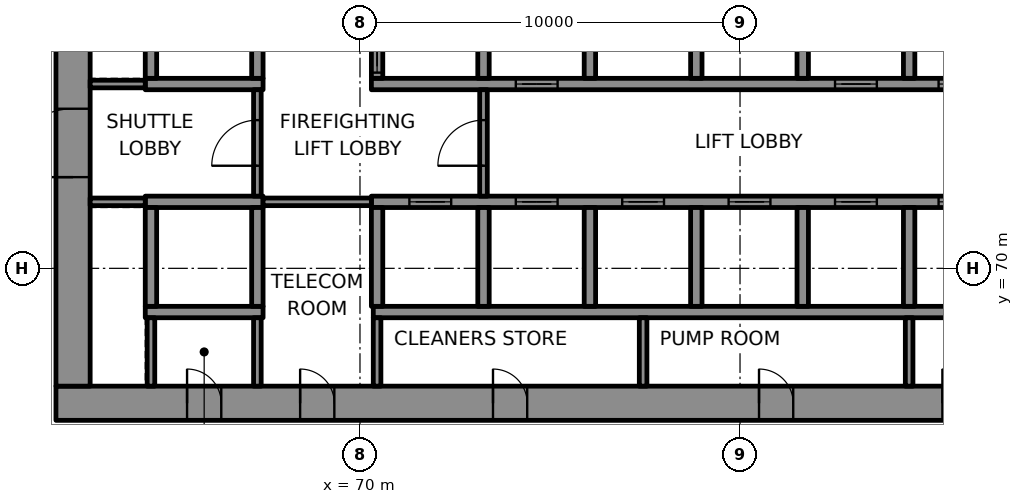
"""IFC4 building model, lengths in metres.
Left out: names, types, materials, properties, quantities, classifications, styles, units other than length and angle.
Written with IfcOpenShell. Run it as: python <this file> out.ifc"""

import sys

from ifc_helpers import new_model, si_unit, direction, frame, frame_2d, origin, place, context, subcontext, project, spatial, rectangle, extrude, element, fill, save


model = new_model("IFC4")
c1 = context("Model", 3, precision=1e-05, world=origin(), true_north=direction((0.0, 1.0)))
c2 = subcontext(c1, "Body", "Model", "MODEL_VIEW")
j1 = project(units=[si_unit("LENGTHUNIT", "METRE"), si_unit("PLANEANGLEUNIT", "RADIAN")], contexts=[c1])
p1 = place(None, origin())
s1 = spatial("IfcSite", under=j1, at=p1, CompositionType="ELEMENT")
p2 = place(p1, origin())
s2 = spatial("IfcBuilding", under=s1, at=p2, CompositionType="ELEMENT")
p3 = place(p2, frame((0.0, 0.0, 21.8)))
s3 = spatial("IfcBuildingStorey", under=s2, at=p3, CompositionType="ELEMENT", Elevation=21.8)
p4 = place(p3, frame((62.0, 66.45, 0.0), z_axis=(0.0, 0.0, 1.0), x_axis=(1.0, 0.0, 0.0)))
e1 = element("IfcWall", 1, at=p4, inside=s3, PredefinedType="SHEAR", context=c2, shape_type="SweptSolid", body=[
    extrude(rectangle(XDim=26.0, YDim=0.9, at=frame_2d((13.0, 0.0))), origin(), (0.0, 0.0, 1.0), 4.3),
])
p5 = place(p4, frame((3.45, 0.0, 0.0)))
e2 = element("IfcOpeningElement", 2, at=p5, cuts=e1, PredefinedType="OPENING", context=c2, shape_type="SweptSolid", body=[
    extrude(rectangle(XDim=0.9, YDim=2.1, at=frame_2d((0.45, 1.05))), frame((0.0, 0.46, 0.0), z_axis=(0.0, -1.0, 0.0), x_axis=(1.0, 0.0, 0.0)), (0.0, 0.0, 1.0), 0.92),
])
p6 = place(p4, frame((6.425, 0.0, 0.0)))
e3 = element("IfcOpeningElement", 3, at=p6, cuts=e1, PredefinedType="OPENING", context=c2, shape_type="SweptSolid", body=[
    extrude(rectangle(XDim=0.9, YDim=2.1, at=frame_2d((0.45, 1.05))), frame((0.0, 0.46, 0.0), z_axis=(0.0, -1.0, 0.0), x_axis=(1.0, 0.0, 0.0)), (0.0, 0.0, 1.0), 0.92),
])
p7 = place(p4, frame((11.5, 0.0, 0.0)))
e4 = element("IfcOpeningElement", 4, at=p7, cuts=e1, PredefinedType="OPENING", context=c2, shape_type="SweptSolid", body=[
    extrude(rectangle(XDim=0.9, YDim=2.1, at=frame_2d((0.45, 1.05))), frame((0.0, 0.46, 0.0), z_axis=(0.0, -1.0, 0.0), x_axis=(1.0, 0.0, 0.0)), (0.0, 0.0, 1.0), 0.92),
])
p8 = place(p4, frame((18.5, 0.0, 0.0)))
e5 = element("IfcOpeningElement", 5, at=p8, cuts=e1, PredefinedType="OPENING", context=c2, shape_type="SweptSolid", body=[
    extrude(rectangle(XDim=0.9, YDim=2.1, at=frame_2d((0.45, 1.05))), frame((0.0, 0.46, 0.0), z_axis=(0.0, -1.0, 0.0), x_axis=(1.0, 0.0, 0.0)), (0.0, 0.0, 1.0), 0.92),
])
p9 = place(p4, frame((23.325, 0.0, 0.0)))
e6 = element("IfcOpeningElement", 6, at=p9, cuts=e1, PredefinedType="OPENING", context=c2, shape_type="SweptSolid", body=[
    extrude(rectangle(XDim=0.9, YDim=2.1, at=frame_2d((0.45, 1.05))), frame((0.0, 0.46, 0.0), z_axis=(0.0, -1.0, 0.0), x_axis=(1.0, 0.0, 0.0)), (0.0, 0.0, 1.0), 0.92),
])
p10 = place(p3, frame((62.45, 66.9, 0.0), z_axis=(0.0, 0.0, 1.0), x_axis=(0.0, 1.0, 0.0)))
e7 = element("IfcWall", 7, at=p10, inside=s3, PredefinedType="SHEAR", context=c2, shape_type="SweptSolid", body=[
    extrude(rectangle(XDim=16.2, YDim=0.9, at=frame_2d((8.1, 0.0))), origin(), (0.0, 0.0, 1.0), 4.3),
])
p11 = place(p10, frame((5.5, 0.0, 0.0)))
e8 = element("IfcOpeningElement", 8, at=p11, cuts=e7, PredefinedType="OPENING", context=c2, shape_type="SweptSolid", body=[
    extrude(rectangle(XDim=1.8, YDim=2.1, at=frame_2d((0.9, 1.05))), frame((0.0, 0.46, 0.0), z_axis=(0.0, -1.0, 0.0), x_axis=(1.0, 0.0, 0.0)), (0.0, 0.0, 1.0), 0.92),
])
p12 = place(p3, frame((64.35, 68.85, 0.0), z_axis=(0.0, 0.0, 1.0), x_axis=(1.0, 0.0, 0.0)))
e9 = element("IfcWall", 9, at=p12, inside=s3, PredefinedType="SHEAR", context=c2, shape_type="SweptSolid", body=[
    extrude(rectangle(XDim=3.1, YDim=0.3, at=frame_2d((1.55, 0.0))), origin(), (0.0, 0.0, 1.0), 4.3),
])
p13 = place(p3, frame((70.35, 68.85, 0.0), z_axis=(0.0, 0.0, 1.0), x_axis=(1.0, 0.0, 0.0)))
e10 = element("IfcWall", 10, at=p13, inside=s3, PredefinedType="SHEAR", context=c2, shape_type="SweptSolid", body=[
    extrude(rectangle(XDim=16.75, YDim=0.3, at=frame_2d((8.375, 0.0))), origin(), (0.0, 0.0, 1.0), 4.3),
])
p14 = place(p3, frame((64.35, 71.75, 0.0), z_axis=(0.0, 0.0, 1.0), x_axis=(1.0, 0.0, 0.0)))
e11 = element("IfcWall", 11, at=p14, inside=s3, PredefinedType="SHEAR", context=c2, shape_type="SweptSolid", body=[
    extrude(rectangle(XDim=3.1, YDim=0.3, at=frame_2d((1.55, 0.0))), origin(), (0.0, 0.0, 1.0), 4.3),
])
p15 = place(p3, frame((70.3, 71.75, 0.0), z_axis=(0.0, 0.0, 1.0), x_axis=(1.0, 0.0, 0.0)))
e12 = element("IfcWall", 12, at=p15, inside=s3, PredefinedType="SHEAR", context=c2, shape_type="SweptSolid", body=[
    extrude(rectangle(XDim=16.8, YDim=0.3, at=frame_2d((8.4, 0.0))), origin(), (0.0, 0.0, 1.0), 4.3),
])
p16 = place(p15, frame((1.0, 0.0, 0.0)))
e13 = element("IfcOpeningElement", 13, at=p16, cuts=e12, PredefinedType="OPENING", context=c2, shape_type="SweptSolid", body=[
    extrude(rectangle(XDim=1.1, YDim=2.1, at=frame_2d((0.55, 1.05))), frame((0.0, 0.16, 0.0), z_axis=(0.0, -1.0, 0.0), x_axis=(1.0, 0.0, 0.0)), (0.0, 0.0, 1.0), 0.32),
])
p17 = place(p15, frame((3.8, 0.0, 0.0)))
e14 = element("IfcOpeningElement", 14, at=p17, cuts=e12, PredefinedType="OPENING", context=c2, shape_type="SweptSolid", body=[
    extrude(rectangle(XDim=1.1, YDim=2.1, at=frame_2d((0.55, 1.05))), frame((0.0, 0.16, 0.0), z_axis=(0.0, -1.0, 0.0), x_axis=(1.0, 0.0, 0.0)), (0.0, 0.0, 1.0), 0.32),
])
p18 = place(p15, frame((6.6, 0.0, 0.0)))
e15 = element("IfcOpeningElement", 15, at=p18, cuts=e12, PredefinedType="OPENING", context=c2, shape_type="SweptSolid", body=[
    extrude(rectangle(XDim=1.1, YDim=2.1, at=frame_2d((0.55, 1.05))), frame((0.0, 0.16, 0.0), z_axis=(0.0, -1.0, 0.0), x_axis=(1.0, 0.0, 0.0)), (0.0, 0.0, 1.0), 0.32),
])
p19 = place(p15, frame((9.4, 0.0, 0.0)))
e16 = element("IfcOpeningElement", 16, at=p19, cuts=e12, PredefinedType="OPENING", context=c2, shape_type="SweptSolid", body=[
    extrude(rectangle(XDim=1.1, YDim=2.1, at=frame_2d((0.55, 1.05))), frame((0.0, 0.16, 0.0), z_axis=(0.0, -1.0, 0.0), x_axis=(1.0, 0.0, 0.0)), (0.0, 0.0, 1.0), 0.32),
])
p20 = place(p15, frame((12.2, 0.0, 0.0)))
e17 = element("IfcOpeningElement", 17, at=p20, cuts=e12, PredefinedType="OPENING", context=c2, shape_type="SweptSolid", body=[
    extrude(rectangle(XDim=1.1, YDim=2.1, at=frame_2d((0.55, 1.05))), frame((0.0, 0.16, 0.0), z_axis=(0.0, -1.0, 0.0), x_axis=(1.0, 0.0, 0.0)), (0.0, 0.0, 1.0), 0.32),
])
p21 = place(p15, frame((14.925, 0.0, 0.0)))
e18 = element("IfcOpeningElement", 18, at=p21, cuts=e12, PredefinedType="OPENING", context=c2, shape_type="SweptSolid", body=[
    extrude(rectangle(XDim=1.1, YDim=2.1, at=frame_2d((0.55, 1.05))), frame((0.0, 0.16, 0.0), z_axis=(0.0, -1.0, 0.0), x_axis=(1.0, 0.0, 0.0)), (0.0, 0.0, 1.0), 0.32),
])
p22 = place(p3, frame((64.35, 74.85, 0.0), z_axis=(0.0, 0.0, 1.0), x_axis=(1.0, 0.0, 0.0)))
e19 = element("IfcWall", 19, at=p22, inside=s3, PredefinedType="SHEAR", context=c2, shape_type="SweptSolid", body=[
    extrude(rectangle(XDim=3.1, YDim=0.3, at=frame_2d((1.55, 0.0))), origin(), (0.0, 0.0, 1.0), 4.3),
])
p23 = place(p3, frame((70.3, 74.85, 0.0), z_axis=(0.0, 0.0, 1.0), x_axis=(1.0, 0.0, 0.0)))
e20 = element("IfcWall", 20, at=p23, inside=s3, PredefinedType="SHEAR", context=c2, shape_type="SweptSolid", body=[
    extrude(rectangle(XDim=16.8, YDim=0.3, at=frame_2d((8.4, 0.0))), origin(), (0.0, 0.0, 1.0), 4.3),
])
p24 = place(p23, frame((3.8, 0.0, 0.0)))
e21 = element("IfcOpeningElement", 21, at=p24, cuts=e20, PredefinedType="OPENING", context=c2, shape_type="SweptSolid", body=[
    extrude(rectangle(XDim=1.1, YDim=2.1, at=frame_2d((0.55, 1.05))), frame((0.0, 0.16, 0.0), z_axis=(0.0, -1.0, 0.0), x_axis=(1.0, 0.0, 0.0)), (0.0, 0.0, 1.0), 0.32),
])
p25 = place(p23, frame((12.2, 0.0, 0.0)))
e22 = element("IfcOpeningElement", 22, at=p25, cuts=e20, PredefinedType="OPENING", context=c2, shape_type="SweptSolid", body=[
    extrude(rectangle(XDim=1.1, YDim=2.1, at=frame_2d((0.55, 1.05))), frame((0.0, 0.16, 0.0), z_axis=(0.0, -1.0, 0.0), x_axis=(1.0, 0.0, 0.0)), (0.0, 0.0, 1.0), 0.32),
])
p26 = place(p23, frame((14.925, 0.0, 0.0)))
e23 = element("IfcOpeningElement", 23, at=p26, cuts=e20, PredefinedType="OPENING", context=c2, shape_type="SweptSolid", body=[
    extrude(rectangle(XDim=1.1, YDim=2.1, at=frame_2d((0.55, 1.05))), frame((0.0, 0.16, 0.0), z_axis=(0.0, -1.0, 0.0), x_axis=(1.0, 0.0, 0.0)), (0.0, 0.0, 1.0), 0.32),
])
for number, where, z_axis, x_axis in (
    (24, (64.5, 69.0, 0.0), (0.0, 0.0, 1.0), (0.0, 1.0, 0.0)),
    (25, (64.5, 75.0, 0.0), (0.0, 0.0, 1.0), (0.0, 1.0, 0.0)),
    (26, (67.3, 69.0, 0.0), (0.0, 0.0, 1.0), (0.0, 1.0, 0.0)),
    (27, (67.3, 75.0, 0.0), (0.0, 0.0, 1.0), (0.0, 1.0, 0.0)),
    (28, (70.45, 69.0, 0.0), (0.0, 0.0, 1.0), (0.0, 1.0, 0.0)),
):
    element("IfcWall", number, at=place(p3, frame(where, z_axis=z_axis, x_axis=x_axis)), inside=s3, PredefinedType="SHEAR", context=c2, shape_type="SweptSolid", body=[
        extrude(rectangle(XDim=2.6, YDim=0.3, at=frame_2d((1.3, 0.0))), origin(), (0.0, 0.0, 1.0), 4.3),
    ])
p27 = place(p3, frame((70.45, 75.0, 0.0), z_axis=(0.0, 0.0, 1.0), x_axis=(0.0, 1.0, 0.0)))
e29 = element("IfcWall", 29, at=p27, inside=s3, PredefinedType="SHEAR", context=c2, shape_type="SweptSolid", body=[
    extrude(rectangle(XDim=2.6, YDim=0.3, at=frame_2d((1.3, 0.0))), origin(), (0.0, 0.0, 1.0), 4.3),
])
p28 = place(p27, frame((0.15, 0.0, 0.0)))
e30 = element("IfcOpeningElement", 30, at=p28, cuts=e29, PredefinedType="OPENING", context=c2, shape_type="SweptSolid", body=[
    extrude(rectangle(XDim=1.1, YDim=2.1, at=frame_2d((0.55, 1.05))), frame((0.0, 0.16, 0.0), z_axis=(0.0, -1.0, 0.0), x_axis=(1.0, 0.0, 0.0)), (0.0, 0.0, 1.0), 0.32),
])
for number, where, z_axis, x_axis in (
    (31, (73.25, 69.0, 0.0), (0.0, 0.0, 1.0), (0.0, 1.0, 0.0)),
    (32, (73.25, 75.0, 0.0), (0.0, 0.0, 1.0), (0.0, 1.0, 0.0)),
    (33, (76.05, 69.0, 0.0), (0.0, 0.0, 1.0), (0.0, 1.0, 0.0)),
    (34, (76.05, 75.0, 0.0), (0.0, 0.0, 1.0), (0.0, 1.0, 0.0)),
    (35, (78.85, 69.0, 0.0), (0.0, 0.0, 1.0), (0.0, 1.0, 0.0)),
    (36, (78.85, 75.0, 0.0), (0.0, 0.0, 1.0), (0.0, 1.0, 0.0)),
    (37, (81.65, 69.0, 0.0), (0.0, 0.0, 1.0), (0.0, 1.0, 0.0)),
    (38, (81.65, 75.0, 0.0), (0.0, 0.0, 1.0), (0.0, 1.0, 0.0)),
    (39, (84.45, 69.0, 0.0), (0.0, 0.0, 1.0), (0.0, 1.0, 0.0)),
    (40, (84.45, 75.0, 0.0), (0.0, 0.0, 1.0), (0.0, 1.0, 0.0)),
):
    element("IfcWall", number, at=place(p3, frame(where, z_axis=z_axis, x_axis=x_axis)), inside=s3, PredefinedType="SHEAR", context=c2, shape_type="SweptSolid", body=[
        extrude(rectangle(XDim=2.6, YDim=0.3, at=frame_2d((1.3, 0.0))), origin(), (0.0, 0.0, 1.0), 4.3),
    ])
p29 = place(p3, frame((62.9, 71.75, 0.0), z_axis=(0.0, 0.0, 1.0), x_axis=(1.0, 0.0, 0.0)))
e41 = element("IfcWall", 41, at=p29, inside=s3, PredefinedType="PARTITIONING", context=c2, shape_type="SweptSolid", body=[
    extrude(rectangle(XDim=1.45, YDim=0.2, at=frame_2d((0.725, 0.0))), origin(), (0.0, 0.0, 1.0), 4.3),
])
p30 = place(p3, frame((67.45, 71.75, 0.0), z_axis=(0.0, 0.0, 1.0), x_axis=(1.0, 0.0, 0.0)))
e42 = element("IfcWall", 42, at=p30, inside=s3, PredefinedType="PARTITIONING", context=c2, shape_type="SweptSolid", body=[
    extrude(rectangle(XDim=2.85, YDim=0.2, at=frame_2d((1.425, 0.0))), origin(), (0.0, 0.0, 1.0), 4.3),
])
p31 = place(p3, frame((62.9, 74.85, 0.0), z_axis=(0.0, 0.0, 1.0), x_axis=(1.0, 0.0, 0.0)))
e43 = element("IfcWall", 43, at=p31, inside=s3, PredefinedType="PARTITIONING", context=c2, shape_type="SweptSolid", body=[
    extrude(rectangle(XDim=1.45, YDim=0.2, at=frame_2d((0.725, 0.0))), origin(), (0.0, 0.0, 1.0), 4.3),
])
for number, where, z_axis, x_axis in (
    (44, (64.5, 66.9, 0.0), (0.0, 0.0, 1.0), (0.0, 1.0, 0.0)),
    (45, (67.3, 66.9, 0.0), (0.0, 0.0, 1.0), (0.0, 1.0, 0.0)),
):
    element("IfcWall", number, at=place(p3, frame(where, z_axis=z_axis, x_axis=x_axis)), inside=s3, PredefinedType="PARTITIONING", context=c2, shape_type="SweptSolid", body=[
        extrude(rectangle(XDim=1.8, YDim=0.2, at=frame_2d((0.9, 0.0))), origin(), (0.0, 0.0, 1.0), 4.3),
    ])
p32 = place(p3, frame((67.3, 71.9, 0.0), z_axis=(0.0, 0.0, 1.0), x_axis=(0.0, 1.0, 0.0)))
e46 = element("IfcWall", 46, at=p32, inside=s3, PredefinedType="PARTITIONING", context=c2, shape_type="SweptSolid", body=[
    extrude(rectangle(XDim=2.8, YDim=0.2, at=frame_2d((1.4, 0.0))), origin(), (0.0, 0.0, 1.0), 4.3),
])
p33 = place(p32, frame((0.8, 0.0, 0.0)))
e47 = element("IfcOpeningElement", 47, at=p33, cuts=e46, PredefinedType="OPENING", context=c2, shape_type="SweptSolid", body=[
    extrude(rectangle(XDim=1.2, YDim=2.1, at=frame_2d((0.6, 1.05))), frame((0.0, 0.11, 0.0), z_axis=(0.0, -1.0, 0.0), x_axis=(1.0, 0.0, 0.0)), (0.0, 0.0, 1.0), 0.22),
])
p34 = place(p3, frame((70.45, 66.9, 0.0), z_axis=(0.0, 0.0, 1.0), x_axis=(0.0, 1.0, 0.0)))
e48 = element("IfcWall", 48, at=p34, inside=s3, PredefinedType="PARTITIONING", context=c2, shape_type="SweptSolid", body=[
    extrude(rectangle(XDim=1.8, YDim=0.2, at=frame_2d((0.9, 0.0))), origin(), (0.0, 0.0, 1.0), 4.3),
])
p35 = place(p3, frame((73.25, 71.9, 0.0), z_axis=(0.0, 0.0, 1.0), x_axis=(0.0, 1.0, 0.0)))
e49 = element("IfcWall", 49, at=p35, inside=s3, PredefinedType="PARTITIONING", context=c2, shape_type="SweptSolid", body=[
    extrude(rectangle(XDim=2.8, YDim=0.2, at=frame_2d((1.4, 0.0))), origin(), (0.0, 0.0, 1.0), 4.3),
])
p36 = place(p35, frame((0.8, 0.0, 0.0)))
e50 = element("IfcOpeningElement", 50, at=p36, cuts=e49, PredefinedType="OPENING", context=c2, shape_type="SweptSolid", body=[
    extrude(rectangle(XDim=1.2, YDim=2.1, at=frame_2d((0.6, 1.05))), frame((0.0, 0.11, 0.0), z_axis=(0.0, -1.0, 0.0), x_axis=(1.0, 0.0, 0.0)), (0.0, 0.0, 1.0), 0.22),
])
for number, where, z_axis, x_axis in (
    (51, (77.45, 66.9, 0.0), (0.0, 0.0, 1.0), (0.0, 1.0, 0.0)),
    (52, (84.45, 66.9, 0.0), (0.0, 0.0, 1.0), (0.0, 1.0, 0.0)),
):
    element("IfcWall", number, at=place(p3, frame(where, z_axis=z_axis, x_axis=x_axis)), inside=s3, PredefinedType="PARTITIONING", context=c2, shape_type="SweptSolid", body=[
        extrude(rectangle(XDim=1.8, YDim=0.2, at=frame_2d((0.9, 0.0))), origin(), (0.0, 0.0, 1.0), 4.3),
    ])
p37 = place(p3, frame((107.106, 62.36, 0.0), z_axis=(0.0, 0.0, 1.0), x_axis=(-0.49999992739, 0.866025445706, 0.0)))
e53 = element("IfcWall", 53, at=p37, inside=s3, PredefinedType="SOLIDWALL", context=c2, shape_type="SweptSolid", body=[
    extrude(rectangle(XDim=54.0, YDim=0.4, at=frame_2d((27.0, 0.0))), origin(), (0.0, 0.0, 1.0), 4.3),
])
p38 = place(p16, origin())
e54 = element("IfcDoor", 54, at=p38, inside=s3, OperationType="DOUBLE_DOOR_SLIDING", PredefinedType="DOOR", context=c2, shape_type="SweptSolid", body=[
    extrude(rectangle(XDim=1.1, YDim=2.1, at=frame_2d((0.55, 1.05))), frame((0.0, 0.025, 0.0), z_axis=(0.0, -1.0, 0.0), x_axis=(1.0, 0.0, 0.0)), (0.0, 0.0, 1.0), 0.05),
])
fill(e13, e54)
p39 = place(p17, origin())
e55 = element("IfcDoor", 55, at=p39, inside=s3, OperationType="DOUBLE_DOOR_SLIDING", PredefinedType="DOOR", context=c2, shape_type="SweptSolid", body=[
    extrude(rectangle(XDim=1.1, YDim=2.1, at=frame_2d((0.55, 1.05))), frame((0.0, 0.025, 0.0), z_axis=(0.0, -1.0, 0.0), x_axis=(1.0, 0.0, 0.0)), (0.0, 0.0, 1.0), 0.05),
])
fill(e14, e55)
p40 = place(p18, origin())
e56 = element("IfcDoor", 56, at=p40, inside=s3, OperationType="DOUBLE_DOOR_SLIDING", PredefinedType="DOOR", context=c2, shape_type="SweptSolid", body=[
    extrude(rectangle(XDim=1.1, YDim=2.1, at=frame_2d((0.55, 1.05))), frame((0.0, 0.025, 0.0), z_axis=(0.0, -1.0, 0.0), x_axis=(1.0, 0.0, 0.0)), (0.0, 0.0, 1.0), 0.05),
])
fill(e15, e56)
p41 = place(p19, origin())
e57 = element("IfcDoor", 57, at=p41, inside=s3, OperationType="DOUBLE_DOOR_SLIDING", PredefinedType="DOOR", context=c2, shape_type="SweptSolid", body=[
    extrude(rectangle(XDim=1.1, YDim=2.1, at=frame_2d((0.55, 1.05))), frame((0.0, 0.025, 0.0), z_axis=(0.0, -1.0, 0.0), x_axis=(1.0, 0.0, 0.0)), (0.0, 0.0, 1.0), 0.05),
])
fill(e16, e57)
p42 = place(p20, origin())
e58 = element("IfcDoor", 58, at=p42, inside=s3, OperationType="DOUBLE_DOOR_SLIDING", PredefinedType="DOOR", context=c2, shape_type="SweptSolid", body=[
    extrude(rectangle(XDim=1.1, YDim=2.1, at=frame_2d((0.55, 1.05))), frame((0.0, 0.025, 0.0), z_axis=(0.0, -1.0, 0.0), x_axis=(1.0, 0.0, 0.0)), (0.0, 0.0, 1.0), 0.05),
])
fill(e17, e58)
p43 = place(p21, origin())
e59 = element("IfcDoor", 59, at=p43, inside=s3, OperationType="DOUBLE_DOOR_SLIDING", PredefinedType="DOOR", context=c2, shape_type="SweptSolid", body=[
    extrude(rectangle(XDim=1.1, YDim=2.1, at=frame_2d((0.55, 1.05))), frame((0.0, 0.025, 0.0), z_axis=(0.0, -1.0, 0.0), x_axis=(1.0, 0.0, 0.0)), (0.0, 0.0, 1.0), 0.05),
])
fill(e18, e59)
p44 = place(p28, origin())
e60 = element("IfcDoor", 60, at=p44, inside=s3, OperationType="DOUBLE_DOOR_SLIDING", PredefinedType="DOOR", context=c2, shape_type="SweptSolid", body=[
    extrude(rectangle(XDim=1.1, YDim=2.1, at=frame_2d((0.55, 1.05))), frame((0.0, 0.025, 0.0), z_axis=(0.0, -1.0, 0.0), x_axis=(1.0, 0.0, 0.0)), (0.0, 0.0, 1.0), 0.05),
])
fill(e30, e60)
p45 = place(p24, origin())
e61 = element("IfcDoor", 61, at=p45, inside=s3, OperationType="DOUBLE_DOOR_SLIDING", PredefinedType="DOOR", context=c2, shape_type="SweptSolid", body=[
    extrude(rectangle(XDim=1.1, YDim=2.1, at=frame_2d((0.55, 1.05))), frame((0.0, 0.025, 0.0), z_axis=(0.0, -1.0, 0.0), x_axis=(1.0, 0.0, 0.0)), (0.0, 0.0, 1.0), 0.05),
])
fill(e21, e61)
p46 = place(p25, origin())
e62 = element("IfcDoor", 62, at=p46, inside=s3, OperationType="DOUBLE_DOOR_SLIDING", PredefinedType="DOOR", context=c2, shape_type="SweptSolid", body=[
    extrude(rectangle(XDim=1.1, YDim=2.1, at=frame_2d((0.55, 1.05))), frame((0.0, 0.025, 0.0), z_axis=(0.0, -1.0, 0.0), x_axis=(1.0, 0.0, 0.0)), (0.0, 0.0, 1.0), 0.05),
])
fill(e22, e62)
p47 = place(p26, origin())
e63 = element("IfcDoor", 63, at=p47, inside=s3, OperationType="DOUBLE_DOOR_SLIDING", PredefinedType="DOOR", context=c2, shape_type="SweptSolid", body=[
    extrude(rectangle(XDim=1.1, YDim=2.1, at=frame_2d((0.55, 1.05))), frame((0.0, 0.025, 0.0), z_axis=(0.0, -1.0, 0.0), x_axis=(1.0, 0.0, 0.0)), (0.0, 0.0, 1.0), 0.05),
])
fill(e23, e63)
p48 = place(p36, origin())
e64 = element("IfcDoor", 64, at=p48, inside=s3, OperationType="SINGLE_SWING_LEFT", PredefinedType="DOOR", context=c2, shape_type="SweptSolid", body=[
    extrude(rectangle(XDim=1.2, YDim=2.1, at=frame_2d((0.6, 1.05))), frame((0.0, 0.025, 0.0), z_axis=(0.0, -1.0, 0.0), x_axis=(1.0, 0.0, 0.0)), (0.0, 0.0, 1.0), 0.05),
])
fill(e50, e64)
p49 = place(p33, origin())
e65 = element("IfcDoor", 65, at=p49, inside=s3, OperationType="SINGLE_SWING_RIGHT", PredefinedType="DOOR", context=c2, shape_type="SweptSolid", body=[
    extrude(rectangle(XDim=1.2, YDim=2.1, at=frame_2d((0.6, 1.05))), frame((0.0, 0.025, 0.0), z_axis=(0.0, -1.0, 0.0), x_axis=(1.0, 0.0, 0.0)), (0.0, 0.0, 1.0), 0.05),
])
fill(e47, e65)
p50 = place(p11, origin())
e66 = element("IfcDoor", 66, at=p50, inside=s3, OperationType="SINGLE_SWING_LEFT", PredefinedType="DOOR", context=c2, shape_type="SweptSolid", body=[
    extrude(rectangle(XDim=1.8, YDim=2.1, at=frame_2d((0.9, 1.05))), frame((0.0, 0.17, 0.0), z_axis=(0.0, -1.0, 0.0), x_axis=(1.0, 0.0, 0.0)), (0.0, 0.0, 1.0), 0.34),
])
fill(e8, e66)
p51 = place(p5, origin())
e67 = element("IfcDoor", 67, at=p51, inside=s3, OperationType="SINGLE_SWING_LEFT", PredefinedType="DOOR", context=c2, shape_type="SweptSolid", body=[
    extrude(rectangle(XDim=0.9, YDim=2.1, at=frame_2d((0.45, 1.05))), frame((0.0, 0.17, 0.0), z_axis=(0.0, -1.0, 0.0), x_axis=(1.0, 0.0, 0.0)), (0.0, 0.0, 1.0), 0.34),
])
fill(e2, e67)
p52 = place(p6, origin())
e68 = element("IfcDoor", 68, at=p52, inside=s3, OperationType="SINGLE_SWING_RIGHT", PredefinedType="DOOR", context=c2, shape_type="SweptSolid", body=[
    extrude(rectangle(XDim=0.9, YDim=2.1, at=frame_2d((0.45, 1.05))), frame((0.0, 0.17, 0.0), z_axis=(0.0, -1.0, 0.0), x_axis=(1.0, 0.0, 0.0)), (0.0, 0.0, 1.0), 0.34),
])
fill(e3, e68)
p53 = place(p7, origin())
e69 = element("IfcDoor", 69, at=p53, inside=s3, OperationType="SINGLE_SWING_LEFT", PredefinedType="DOOR", context=c2, shape_type="SweptSolid", body=[
    extrude(rectangle(XDim=0.9, YDim=2.1, at=frame_2d((0.45, 1.05))), frame((0.0, 0.17, 0.0), z_axis=(0.0, -1.0, 0.0), x_axis=(1.0, 0.0, 0.0)), (0.0, 0.0, 1.0), 0.34),
])
fill(e4, e69)
p54 = place(p8, origin())
e70 = element("IfcDoor", 70, at=p54, inside=s3, OperationType="SINGLE_SWING_RIGHT", PredefinedType="DOOR", context=c2, shape_type="SweptSolid", body=[
    extrude(rectangle(XDim=0.9, YDim=2.1, at=frame_2d((0.45, 1.05))), frame((0.0, 0.17, 0.0), z_axis=(0.0, -1.0, 0.0), x_axis=(1.0, 0.0, 0.0)), (0.0, 0.0, 1.0), 0.34),
])
fill(e5, e70)
p55 = place(p9, origin())
e71 = element("IfcDoor", 71, at=p55, inside=s3, OperationType="SINGLE_SWING_LEFT", PredefinedType="DOOR", context=c2, shape_type="SweptSolid", body=[
    extrude(rectangle(XDim=0.9, YDim=2.1, at=frame_2d((0.45, 1.05))), frame((0.0, 0.17, 0.0), z_axis=(0.0, -1.0, 0.0), x_axis=(1.0, 0.0, 0.0)), (0.0, 0.0, 1.0), 0.34),
])
fill(e6, e71)
save(model, sys.argv[1])
